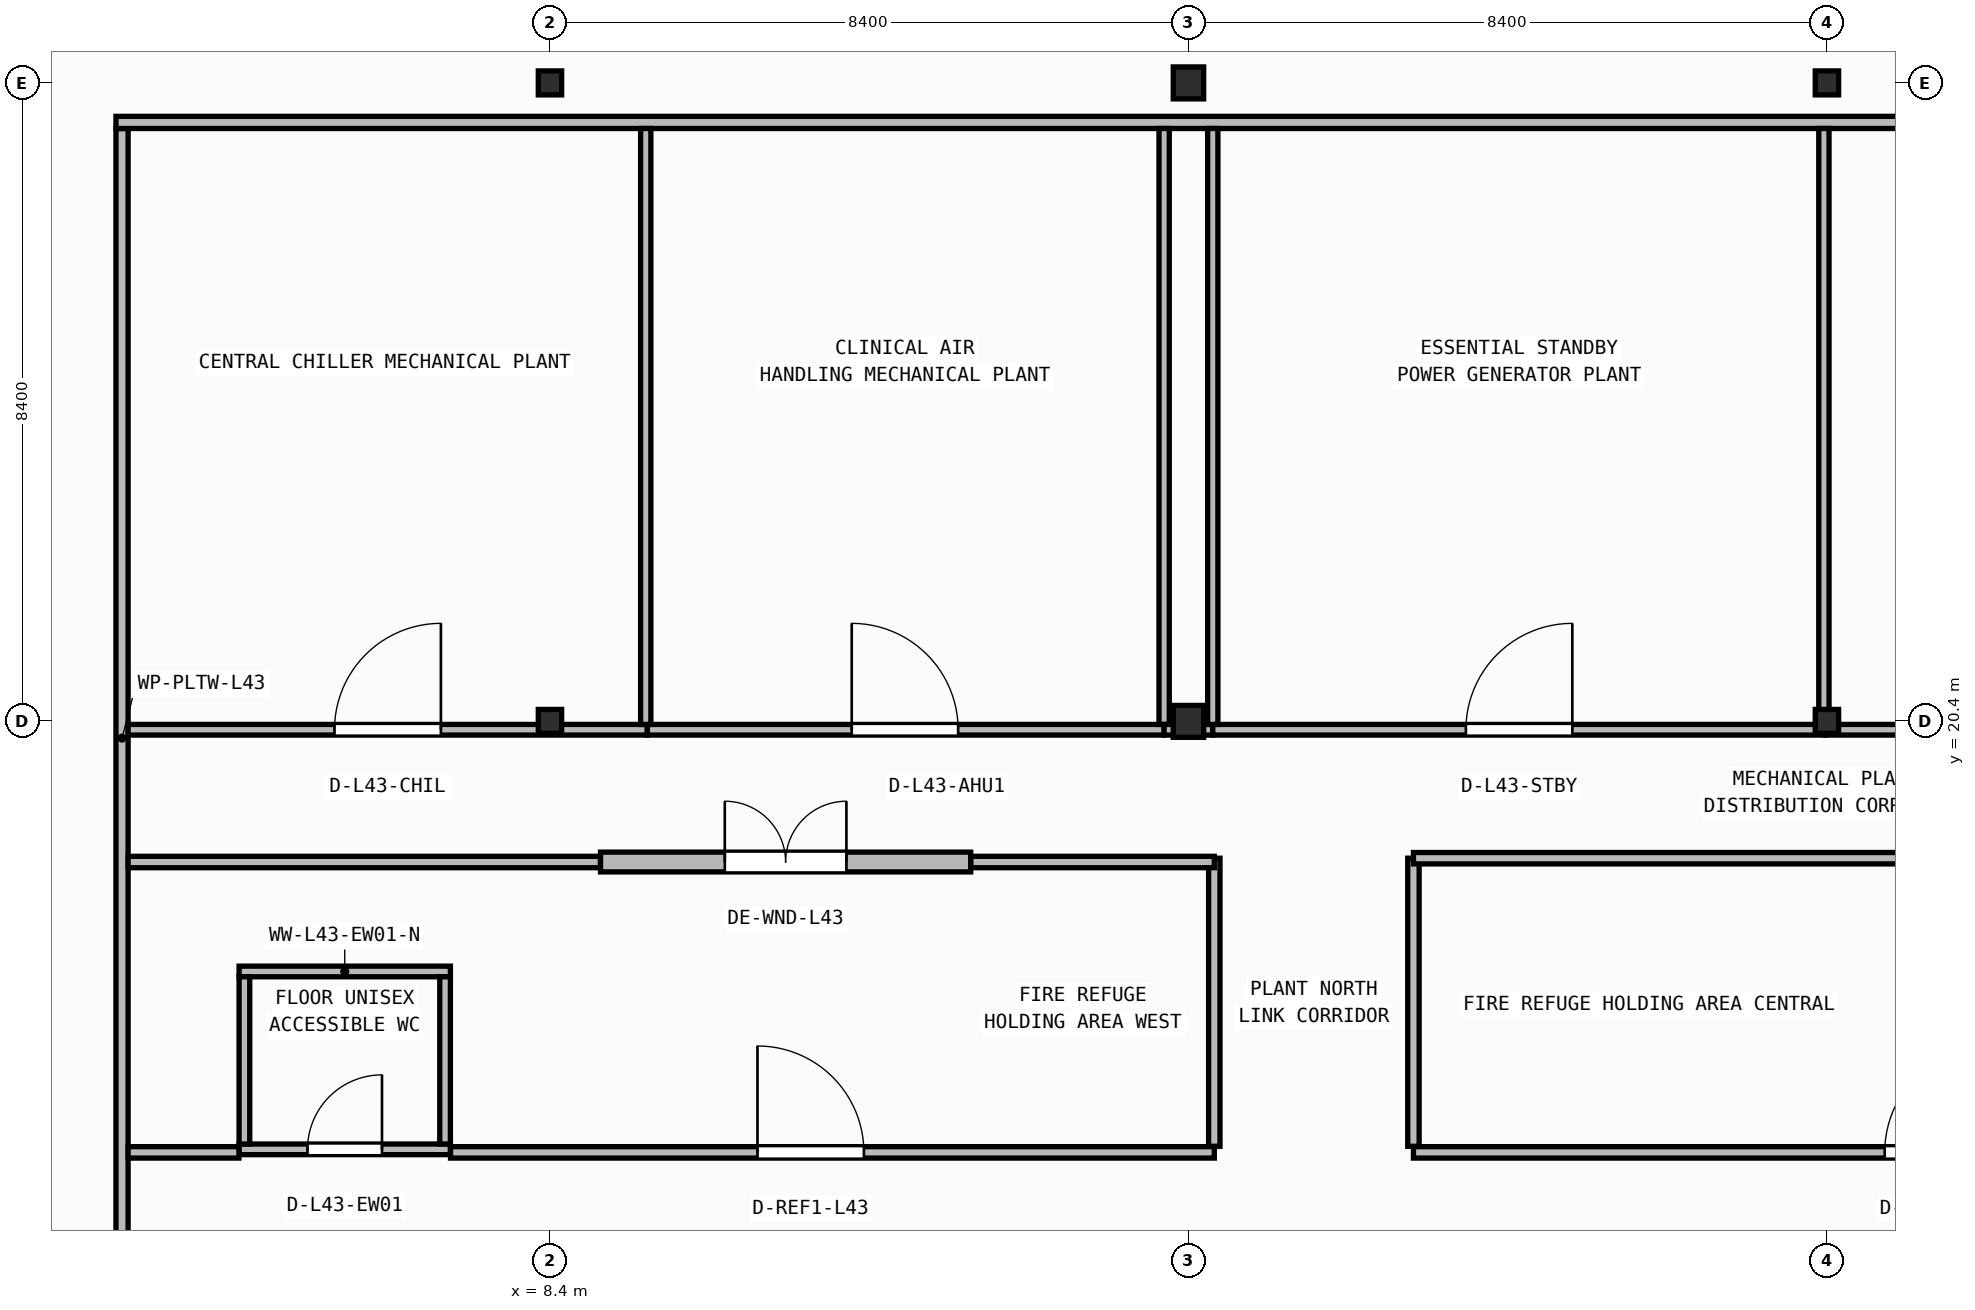
"""IFC4 building model, lengths in metres.
Left out: names, types, materials, properties, quantities, classifications, styles, units other than length and angle.
Written with IfcOpenShell. Run it as: python <this file> out.ifc"""

import sys

from ifc_helpers import new_model, si_unit, direction, frame, frame_2d, origin, origin_2d, place, context, subcontext, project, spatial, rectangle, i_section, extrude, element, fill, save


model = new_model("IFC4")
c1 = context("Model", 3, precision=1e-05, world=origin(), true_north=direction((0.0, 1.0)))
c2 = subcontext(c1, "Body", "Model", "MODEL_VIEW")
j1 = project(units=[si_unit("LENGTHUNIT", "METRE"), si_unit("PLANEANGLEUNIT", "RADIAN")], contexts=[c1])
p1 = place(None, origin())
s1 = spatial("IfcSite", under=j1, at=p1, CompositionType="ELEMENT")
p2 = place(p1, origin())
s2 = spatial("IfcBuilding", under=s1, at=p2, CompositionType="ELEMENT")
p3 = place(p2, frame((0.0, 0.0, 174.45)))
s3 = spatial("IfcBuildingStorey", under=s2, at=p3, CompositionType="ELEMENT", Elevation=174.45)
p4 = place(p3, frame((8.4, 20.4, 0.0), z_axis=(0.0, 0.0, 1.0), x_axis=(1.0, 0.0, 0.0)))
e1 = element("IfcColumn", 1, at=p4, inside=s3, PredefinedType="COLUMN", context=c2, shape_type="SweptSolid", body=[
    extrude(i_section(OverallWidth=0.307, OverallDepth=0.315, WebThickness=0.012, FlangeThickness=0.019, FilletRadius=0.017, at=origin_2d()), origin(), (0.0, 0.0, 1.0), 5.8),
])
p5 = place(p3, frame((16.8, 20.4, 0.0), z_axis=(0.0, 0.0, 1.0), x_axis=(1.0, 0.0, 0.0)))
e2 = element("IfcColumn", 2, at=p5, inside=s3, PredefinedType="COLUMN", context=c2, shape_type="SweptSolid", body=[
    extrude(i_section(OverallWidth=0.4, OverallDepth=0.42, WebThickness=0.025, FlangeThickness=0.04, at=origin_2d()), origin(), (0.0, 0.0, 1.0), 5.8),
])
for number, where, z_axis, x_axis in (
    (3, (25.2, 20.4, 0.0), (0.0, 0.0, 1.0), (1.0, 0.0, 0.0)),
    (4, (8.4, 28.8, 0.0), (0.0, 0.0, 1.0), (1.0, 0.0, 0.0)),
):
    element("IfcColumn", number, at=place(p3, frame(where, z_axis=z_axis, x_axis=x_axis)), inside=s3, PredefinedType="COLUMN", context=c2, shape_type="SweptSolid", body=[
        extrude(i_section(OverallWidth=0.307, OverallDepth=0.315, WebThickness=0.012, FlangeThickness=0.019, FilletRadius=0.017, at=origin_2d()), origin(), (0.0, 0.0, 1.0), 5.8),
    ])
p6 = place(p3, frame((16.8, 28.8, 0.0), z_axis=(0.0, 0.0, 1.0), x_axis=(1.0, 0.0, 0.0)))
e5 = element("IfcColumn", 5, at=p6, inside=s3, PredefinedType="COLUMN", context=c2, shape_type="SweptSolid", body=[
    extrude(i_section(OverallWidth=0.4, OverallDepth=0.42, WebThickness=0.025, FlangeThickness=0.04, at=origin_2d()), origin(), (0.0, 0.0, 1.0), 5.8),
])
p7 = place(p3, frame((25.2, 28.8, 0.0), z_axis=(0.0, 0.0, 1.0), x_axis=(1.0, 0.0, 0.0)))
e6 = element("IfcColumn", 6, at=p7, inside=s3, PredefinedType="COLUMN", context=c2, shape_type="SweptSolid", body=[
    extrude(i_section(OverallWidth=0.307, OverallDepth=0.315, WebThickness=0.012, FlangeThickness=0.019, FilletRadius=0.017, at=origin_2d()), origin(), (0.0, 0.0, 1.0), 5.8),
])
p8 = place(p3, frame((9.065, 18.55, 0.0), z_axis=(0.0, 0.0, 1.0), x_axis=(1.0, 0.0, 0.0)))
e7 = element("IfcWall", 7, at=p8, inside=s3, PredefinedType="STANDARD", context=c2, shape_type="SweptSolid", body=[
    extrude(rectangle(XDim=4.87, YDim=0.26, at=frame_2d((2.435, 0.0))), origin(), (0.0, 0.0, 1.0), 5.56),
])
p9 = place(p8, frame((1.635, 0.0, 0.0)))
e8 = element("IfcOpeningElement", 8, at=p9, cuts=e7, PredefinedType="OPENING", context=c2, shape_type="SweptSolid", body=[
    extrude(rectangle(XDim=1.6, YDim=2.2, at=frame_2d((0.8, 1.1))), frame((0.0, 0.14, 0.0), z_axis=(0.0, -1.0, 0.0), x_axis=(1.0, 0.0, 0.0)), (0.0, 0.0, 1.0), 0.28),
])
p10 = place(p3, frame((4.31, 14.77, 0.0), z_axis=(0.0, 0.0, 1.0), x_axis=(1.0, 0.0, 0.0)))
e9 = element("IfcWall", 9, at=p10, inside=s3, PredefinedType="PARTITIONING", context=c2, shape_type="SweptSolid", body=[
    extrude(rectangle(XDim=2.78, YDim=0.14, at=frame_2d((1.39, 0.0))), origin(), (0.0, 0.0, 1.0), 5.56),
])
p11 = place(p10, frame((0.9, 0.0, 0.0)))
e10 = element("IfcOpeningElement", 10, at=p11, cuts=e9, PredefinedType="OPENING", context=c2, shape_type="SweptSolid", body=[
    extrude(rectangle(XDim=0.98, YDim=2.1, at=frame_2d((0.49, 1.05))), frame((0.0, 0.08, 0.0), z_axis=(0.0, -1.0, 0.0), x_axis=(1.0, 0.0, 0.0)), (0.0, 0.0, 1.0), 0.16),
])
p12 = place(p3, frame((4.31, 17.11, 0.0), z_axis=(0.0, 0.0, 1.0), x_axis=(1.0, 0.0, 0.0)))
e11 = element("IfcWall", 11, at=p12, inside=s3, PredefinedType="PARTITIONING", context=c2, shape_type="SweptSolid", body=[
    extrude(rectangle(XDim=2.78, YDim=0.14, at=frame_2d((1.39, 0.0))), origin(), (0.0, 0.0, 1.0), 5.56),
])
for number, where, z_axis, x_axis in (
    (12, (4.38, 14.84, 0.0), (0.0, 0.0, 1.0), (0.0, 1.0, 0.0)),
    (13, (7.02, 14.84, 0.0), (0.0, 0.0, 1.0), (0.0, 1.0, 0.0)),
):
    element("IfcWall", number, at=place(p3, frame(where, z_axis=z_axis, x_axis=x_axis)), inside=s3, PredefinedType="PARTITIONING", context=c2, shape_type="SweptSolid", body=[
        extrude(rectangle(XDim=2.2, YDim=0.14, at=frame_2d((1.1, 0.0))), origin(), (0.0, 0.0, 1.0), 5.56),
    ])
p13 = place(p3, frame((2.77, 12.16, 0.0), z_axis=(0.0, 0.0, 1.0), x_axis=(0.0, 1.0, 0.0)))
e14 = element("IfcWall", 14, at=p13, inside=s3, PredefinedType="PARTITIONING", context=c2, shape_type="SweptSolid", body=[
    extrude(rectangle(XDim=16.04, YDim=0.16, at=frame_2d((8.02, 0.0))), origin(), (0.0, 0.0, 1.0), 5.56),
])
p14 = place(p3, frame((2.69, 28.28, 0.0), z_axis=(0.0, 0.0, 1.0), x_axis=(1.0, 0.0, 0.0)))
e15 = element("IfcWall", 15, at=p14, inside=s3, PredefinedType="PARTITIONING", context=c2, shape_type="SweptSolid", body=[
    extrude(rectangle(XDim=30.59, YDim=0.16, at=frame_2d((15.295, 0.0))), origin(), (0.0, 0.0, 1.0), 5.56),
])
p15 = place(p3, frame((2.85, 14.73, 0.0), z_axis=(0.0, 0.0, 1.0), x_axis=(1.0, 0.0, 0.0)))
e16 = element("IfcWall", 16, at=p15, inside=s3, PredefinedType="PARTITIONING", context=c2, shape_type="SweptSolid", body=[
    extrude(rectangle(XDim=1.458, YDim=0.15, at=frame_2d((0.729, 0.0))), origin(), (0.0, 0.0, 1.0), 5.56),
])
p16 = place(p3, frame((7.092, 14.73, 0.0), z_axis=(0.0, 0.0, 1.0), x_axis=(1.0, 0.0, 0.0)))
e17 = element("IfcWall", 17, at=p16, inside=s3, PredefinedType="PARTITIONING", context=c2, shape_type="SweptSolid", body=[
    extrude(rectangle(XDim=10.048, YDim=0.15, at=frame_2d((5.024, 0.0))), origin(), (0.0, 0.0, 1.0), 5.56),
])
p17 = place(p16, frame((4.038, 0.0, 0.0)))
e18 = element("IfcOpeningElement", 18, at=p17, cuts=e17, PredefinedType="OPENING", context=c2, shape_type="SweptSolid", body=[
    extrude(rectangle(XDim=1.4, YDim=2.15, at=frame_2d((0.7, 1.075))), frame((0.0, 0.085, 0.0), z_axis=(0.0, -1.0, 0.0), x_axis=(1.0, 0.0, 0.0)), (0.0, 0.0, 1.0), 0.17),
])
p18 = place(p3, frame((17.14, 14.81, 0.0), z_axis=(0.0, 0.0, 1.0), x_axis=(0.0, 1.0, 0.0)))
e19 = element("IfcWall", 19, at=p18, inside=s3, PredefinedType="PARTITIONING", context=c2, shape_type="SweptSolid", body=[
    extrude(rectangle(XDim=3.79, YDim=0.15, at=frame_2d((1.895, 0.0))), origin(), (0.0, 0.0, 1.0), 5.56),
])
p19 = place(p3, frame((2.85, 18.55, 0.0), z_axis=(0.0, 0.0, 1.0), x_axis=(1.0, 0.0, 0.0)))
e20 = element("IfcWall", 20, at=p19, inside=s3, PredefinedType="PARTITIONING", context=c2, shape_type="SweptSolid", body=[
    extrude(rectangle(XDim=6.213, YDim=0.15, at=frame_2d((3.106, 0.0))), origin(), (0.0, 0.0, 1.0), 5.56),
])
p20 = place(p3, frame((13.937, 18.55, 0.0), z_axis=(0.0, 0.0, 1.0), x_axis=(1.0, 0.0, 0.0)))
e21 = element("IfcWall", 21, at=p20, inside=s3, PredefinedType="PARTITIONING", context=c2, shape_type="SweptSolid", body=[
    extrude(rectangle(XDim=3.203, YDim=0.15, at=frame_2d((1.602, 0.0))), origin(), (0.0, 0.0, 1.0), 5.56),
])
p21 = place(p3, frame((19.76, 14.81, 0.0), z_axis=(0.0, 0.0, 1.0), x_axis=(0.0, 1.0, 0.0)))
e22 = element("IfcWall", 22, at=p21, inside=s3, PredefinedType="PARTITIONING", context=c2, shape_type="SweptSolid", body=[
    extrude(rectangle(XDim=3.79, YDim=0.15, at=frame_2d((1.895, 0.0))), origin(), (0.0, 0.0, 1.0), 5.56),
])
p22 = place(p3, frame((19.76, 14.73, 0.0), z_axis=(0.0, 0.0, 1.0), x_axis=(1.0, 0.0, 0.0)))
e23 = element("IfcWall", 23, at=p22, inside=s3, PredefinedType="PARTITIONING", context=c2, shape_type="SweptSolid", body=[
    extrude(rectangle(XDim=13.84, YDim=0.15, at=frame_2d((6.92, 0.0))), origin(), (0.0, 0.0, 1.0), 5.56),
])
p23 = place(p22, frame((6.2, 0.0, 0.0)))
e24 = element("IfcOpeningElement", 24, at=p23, cuts=e23, PredefinedType="OPENING", context=c2, shape_type="SweptSolid", body=[
    extrude(rectangle(XDim=1.4, YDim=2.15, at=frame_2d((0.7, 1.075))), frame((0.0, 0.085, 0.0), z_axis=(0.0, -1.0, 0.0), x_axis=(1.0, 0.0, 0.0)), (0.0, 0.0, 1.0), 0.17),
])
p24 = place(p3, frame((19.76, 18.6, 0.0), z_axis=(0.0, 0.0, 1.0), x_axis=(1.0, 0.0, 0.0)))
e25 = element("IfcWall", 25, at=p24, inside=s3, PredefinedType="PARTITIONING", context=c2, shape_type="SweptSolid", body=[
    extrude(rectangle(XDim=28.64, YDim=0.15, at=frame_2d((14.32, 0.0))), origin(), (0.0, 0.0, 1.0), 5.56),
])
p25 = place(p3, frame((2.85, 20.29, 0.0), z_axis=(0.0, 0.0, 1.0), x_axis=(1.0, 0.0, 0.0)))
e26 = element("IfcWall", 26, at=p25, inside=s3, PredefinedType="PARTITIONING", context=c2, shape_type="SweptSolid", body=[
    extrude(rectangle(XDim=6.83, YDim=0.14, at=frame_2d((3.415, 0.0))), origin(), (0.0, 0.0, 1.0), 4.835),
])
p26 = place(p25, frame((2.715, 0.0, 0.0)))
e27 = element("IfcOpeningElement", 27, at=p26, cuts=e26, PredefinedType="OPENING", context=c2, shape_type="SweptSolid", body=[
    extrude(rectangle(XDim=1.4, YDim=2.15, at=frame_2d((0.7, 1.075))), frame((0.0, 0.08, 0.0), z_axis=(0.0, -1.0, 0.0), x_axis=(1.0, 0.0, 0.0)), (0.0, 0.0, 1.0), 0.16),
])
p27 = place(p3, frame((9.682, 20.29, 0.0), z_axis=(0.0, 0.0, 1.0), x_axis=(1.0, 0.0, 0.0)))
e28 = element("IfcWall", 28, at=p27, inside=s3, PredefinedType="PARTITIONING", context=c2, shape_type="SweptSolid", body=[
    extrude(rectangle(XDim=6.798, YDim=0.14, at=frame_2d((3.399, 0.0))), origin(), (0.0, 0.0, 1.0), 4.835),
])
p28 = place(p27, frame((2.688, 0.0, 0.0)))
e29 = element("IfcOpeningElement", 29, at=p28, cuts=e28, PredefinedType="OPENING", context=c2, shape_type="SweptSolid", body=[
    extrude(rectangle(XDim=1.4, YDim=2.15, at=frame_2d((0.7, 1.075))), frame((0.0, 0.08, 0.0), z_axis=(0.0, -1.0, 0.0), x_axis=(1.0, 0.0, 0.0)), (0.0, 0.0, 1.0), 0.16),
])
p29 = place(p3, frame((9.66, 20.36, 0.0), z_axis=(0.0, 0.0, 1.0), x_axis=(0.0, 1.0, 0.0)))
e30 = element("IfcWall", 30, at=p29, inside=s3, PredefinedType="PARTITIONING", context=c2, shape_type="SweptSolid", body=[
    extrude(rectangle(XDim=7.84, YDim=0.135, at=frame_2d((3.92, 0.0))), origin(), (0.0, 0.0, 1.0), 5.56),
])
p30 = place(p3, frame((16.48, 20.36, 0.0), z_axis=(0.0, 0.0, 1.0), x_axis=(0.0, 1.0, 0.0)))
e31 = element("IfcWall", 31, at=p30, inside=s3, PredefinedType="PARTITIONING", context=c2, shape_type="SweptSolid", body=[
    extrude(rectangle(XDim=7.84, YDim=0.135, at=frame_2d((3.92, 0.0))), origin(), (0.0, 0.0, 1.0), 4.325),
])
p31 = place(p3, frame((16.48, 20.29, 0.0), z_axis=(0.0, 0.0, 1.0), x_axis=(1.0, 0.0, 0.0)))
e32 = element("IfcWall", 32, at=p31, inside=s3, PredefinedType="PARTITIONING", context=c2, shape_type="SweptSolid", body=[
    extrude(rectangle(XDim=0.64, YDim=0.14, at=frame_2d((0.32, 0.0))), origin(), (0.0, 0.0, 1.0), 4.835),
])
p32 = place(p3, frame((17.12, 20.29, 0.0), z_axis=(0.0, 0.0, 1.0), x_axis=(1.0, 0.0, 0.0)))
e33 = element("IfcWall", 33, at=p32, inside=s3, PredefinedType="PARTITIONING", context=c2, shape_type="SweptSolid", body=[
    extrude(rectangle(XDim=8.06, YDim=0.14, at=frame_2d((4.03, 0.0))), origin(), (0.0, 0.0, 1.0), 4.835),
])
p33 = place(p32, frame((3.33, 0.0, 0.0)))
e34 = element("IfcOpeningElement", 34, at=p33, cuts=e33, PredefinedType="OPENING", context=c2, shape_type="SweptSolid", body=[
    extrude(rectangle(XDim=1.4, YDim=2.15, at=frame_2d((0.7, 1.075))), frame((0.0, 0.08, 0.0), z_axis=(0.0, -1.0, 0.0), x_axis=(1.0, 0.0, 0.0)), (0.0, 0.0, 1.0), 0.16),
])
p34 = place(p3, frame((17.12, 20.36, 0.0), z_axis=(0.0, 0.0, 1.0), x_axis=(0.0, 1.0, 0.0)))
e35 = element("IfcWall", 35, at=p34, inside=s3, PredefinedType="PARTITIONING", context=c2, shape_type="SweptSolid", body=[
    extrude(rectangle(XDim=7.84, YDim=0.135, at=frame_2d((3.92, 0.0))), origin(), (0.0, 0.0, 1.0), 4.325),
])
p35 = place(p3, frame((25.182, 20.29, 0.0), z_axis=(0.0, 0.0, 1.0), x_axis=(1.0, 0.0, 0.0)))
e36 = element("IfcWall", 36, at=p35, inside=s3, PredefinedType="PARTITIONING", context=c2, shape_type="SweptSolid", body=[
    extrude(rectangle(XDim=8.098, YDim=0.14, at=frame_2d((4.049, 0.0))), origin(), (0.0, 0.0, 1.0), 4.835),
])
p36 = place(p35, frame((3.338, 0.0, 0.0)))
e37 = element("IfcOpeningElement", 37, at=p36, cuts=e36, PredefinedType="OPENING", context=c2, shape_type="SweptSolid", body=[
    extrude(rectangle(XDim=1.4, YDim=2.15, at=frame_2d((0.7, 1.075))), frame((0.0, 0.08, 0.0), z_axis=(0.0, -1.0, 0.0), x_axis=(1.0, 0.0, 0.0)), (0.0, 0.0, 1.0), 0.16),
])
p37 = place(p3, frame((25.16, 20.36, 0.0), z_axis=(0.0, 0.0, 1.0), x_axis=(0.0, 1.0, 0.0)))
e38 = element("IfcWall", 38, at=p37, inside=s3, PredefinedType="PARTITIONING", context=c2, shape_type="SweptSolid", body=[
    extrude(rectangle(XDim=7.84, YDim=0.135, at=frame_2d((3.92, 0.0))), origin(), (0.0, 0.0, 1.0), 4.325),
])
p38 = place(p9, origin())
e39 = element("IfcDoor", 39, at=p38, inside=s3, OperationType="DOUBLE_DOOR_SINGLE_SWING", PredefinedType="DOOR", context=c2, shape_type="SweptSolid", body=[
    extrude(rectangle(XDim=1.6, YDim=2.2, at=frame_2d((0.8, 1.1))), frame((0.0, 0.025, 0.0), z_axis=(0.0, -1.0, 0.0), x_axis=(1.0, 0.0, 0.0)), (0.0, 0.0, 1.0), 0.05),
])
fill(e8, e39)
p39 = place(p11, origin())
e40 = element("IfcDoor", 40, at=p39, inside=s3, OperationType="SINGLE_SWING_RIGHT", PredefinedType="DOOR", context=c2, shape_type="SweptSolid", body=[
    extrude(rectangle(XDim=0.98, YDim=2.1, at=frame_2d((0.49, 1.05))), frame((0.0, 0.025, 0.0), z_axis=(0.0, -1.0, 0.0), x_axis=(1.0, 0.0, 0.0)), (0.0, 0.0, 1.0), 0.05),
])
fill(e10, e40)
p40 = place(p17, origin())
e41 = element("IfcDoor", 41, at=p40, inside=s3, OperationType="SINGLE_SWING_LEFT", PredefinedType="DOOR", context=c2, shape_type="SweptSolid", body=[
    extrude(rectangle(XDim=1.4, YDim=2.15, at=frame_2d((0.7, 1.075))), frame((0.0, 0.025, 0.0), z_axis=(0.0, -1.0, 0.0), x_axis=(1.0, 0.0, 0.0)), (0.0, 0.0, 1.0), 0.05),
])
fill(e18, e41)
p41 = place(p23, origin())
e42 = element("IfcDoor", 42, at=p41, inside=s3, OperationType="SINGLE_SWING_RIGHT", PredefinedType="DOOR", context=c2, shape_type="SweptSolid", body=[
    extrude(rectangle(XDim=1.4, YDim=2.15, at=frame_2d((0.7, 1.075))), frame((0.0, 0.025, 0.0), z_axis=(0.0, -1.0, 0.0), x_axis=(1.0, 0.0, 0.0)), (0.0, 0.0, 1.0), 0.05),
])
fill(e24, e42)
p42 = place(p26, origin())
e43 = element("IfcDoor", 43, at=p42, inside=s3, OperationType="SINGLE_SWING_RIGHT", PredefinedType="DOOR", context=c2, shape_type="SweptSolid", body=[
    extrude(rectangle(XDim=1.4, YDim=2.15, at=frame_2d((0.7, 1.075))), frame((0.0, 0.025, 0.0), z_axis=(0.0, -1.0, 0.0), x_axis=(1.0, 0.0, 0.0)), (0.0, 0.0, 1.0), 0.05),
])
fill(e27, e43)
p43 = place(p28, origin())
e44 = element("IfcDoor", 44, at=p43, inside=s3, OperationType="SINGLE_SWING_LEFT", PredefinedType="DOOR", context=c2, shape_type="SweptSolid", body=[
    extrude(rectangle(XDim=1.4, YDim=2.15, at=frame_2d((0.7, 1.075))), frame((0.0, 0.025, 0.0), z_axis=(0.0, -1.0, 0.0), x_axis=(1.0, 0.0, 0.0)), (0.0, 0.0, 1.0), 0.05),
])
fill(e29, e44)
p44 = place(p33, origin())
e45 = element("IfcDoor", 45, at=p44, inside=s3, OperationType="SINGLE_SWING_RIGHT", PredefinedType="DOOR", context=c2, shape_type="SweptSolid", body=[
    extrude(rectangle(XDim=1.4, YDim=2.15, at=frame_2d((0.7, 1.075))), frame((0.0, 0.025, 0.0), z_axis=(0.0, -1.0, 0.0), x_axis=(1.0, 0.0, 0.0)), (0.0, 0.0, 1.0), 0.05),
])
fill(e34, e45)
save(model, sys.argv[1])
